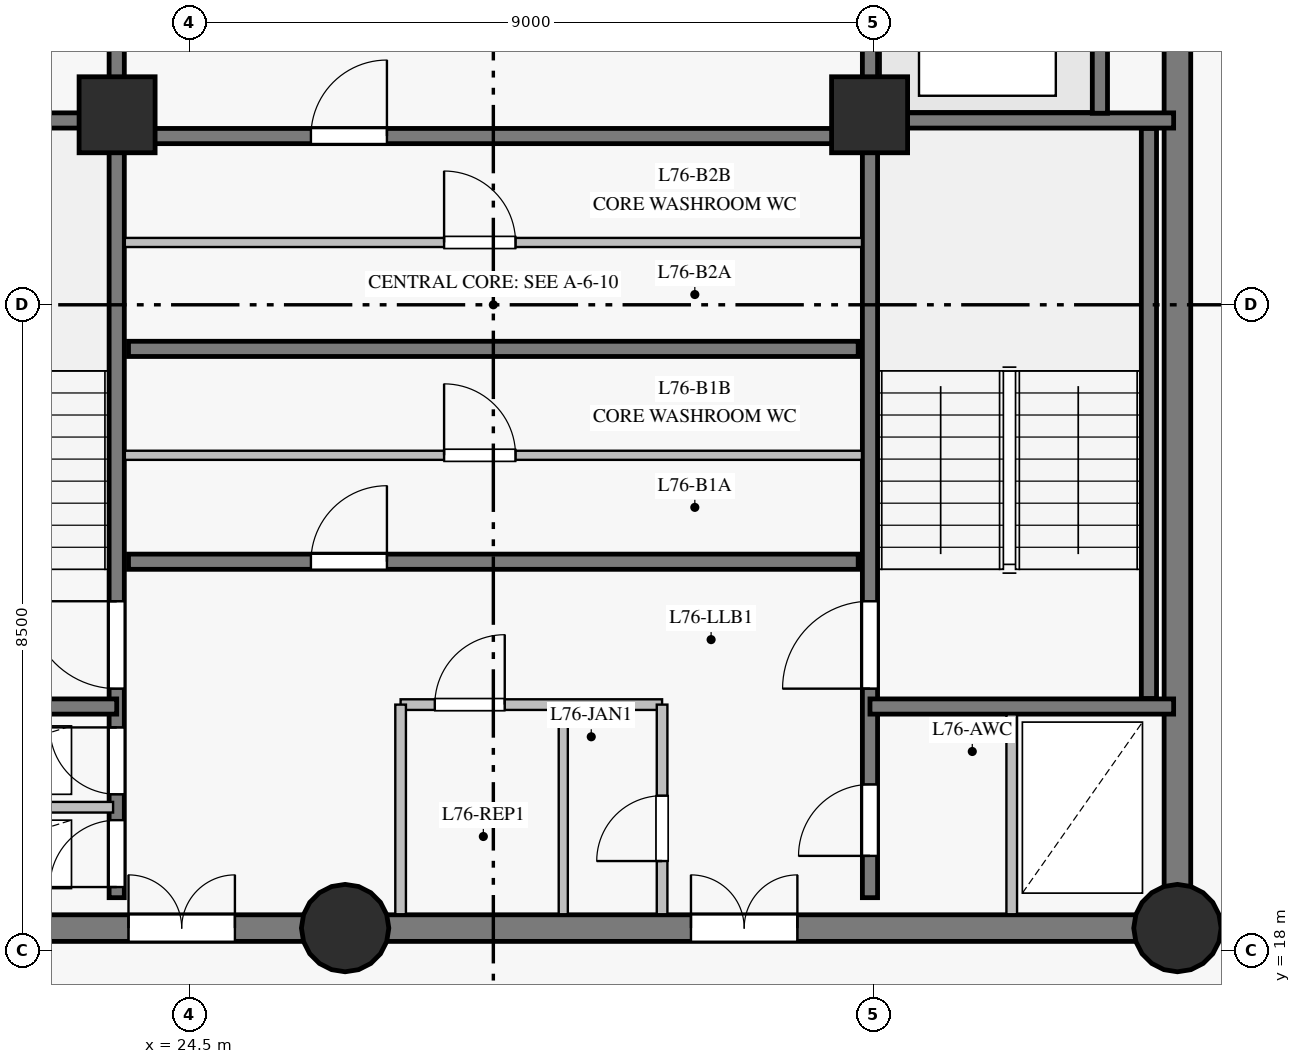
"""IFC4 building model, lengths in metres.
Left out: names, types, materials, properties, quantities, classifications, styles, units other than length and angle.
Written with IfcOpenShell. Run it as: python <this file> out.ifc"""

import sys

from ifc_helpers import new_model, si_unit, direction, frame, frame_2d, origin, origin_with_axes, origin_2d, place, context, subcontext, project, spatial, rectangle, circle, extrude, source, transform, mapped, element, fill, save


model = new_model("IFC4")
c1 = context("Model", 3, precision=1e-05, world=origin(), true_north=direction((0.0, 1.0)))
c2 = subcontext(c1, "Body", "Model", "MODEL_VIEW")
j1 = project(units=[si_unit("LENGTHUNIT", "METRE"), si_unit("PLANEANGLEUNIT", "RADIAN")], contexts=[c1])
p1 = place(None, origin())
s1 = spatial("IfcSite", under=j1, at=p1, CompositionType="ELEMENT")
p2 = place(p1, origin())
s2 = spatial("IfcBuilding", under=s1, at=p2, CompositionType="ELEMENT")
p3 = place(p2, frame((0.0, 0.0, 256.55)))
s3 = spatial("IfcBuildingStorey", under=s2, at=p3, CompositionType="ELEMENT", Elevation=256.55)
p4 = place(p3, frame((19.5, 18.3, 0.0), z_axis=(0.0, 0.0, 1.0), x_axis=(1.0, 0.0, 0.0)))
e1 = element("IfcWall", 1, at=p4, inside=s3, PredefinedType="SHEAR", context=c2, shape_type="SweptSolid", body=[
    extrude(rectangle(XDim=7.05, YDim=0.35, at=frame_2d((3.525, 0.0))), origin(), (0.0, 0.0, 1.0), 2.85),
])
p5 = place(p4, frame((4.2, 0.0, 0.0)))
e2 = element("IfcOpeningElement", 2, at=p5, cuts=e1, PredefinedType="OPENING", context=c2, shape_type="SweptSolid", body=[
    extrude(rectangle(XDim=1.4, YDim=2.2, at=frame_2d((0.7, 1.1))), frame((0.0, 0.185, 0.0), z_axis=(0.0, -1.0, 0.0), x_axis=(1.0, 0.0, 0.0)), (0.0, 0.0, 1.0), 0.37),
])
p6 = place(p3, frame((26.55, 18.3, 0.0), z_axis=(0.0, 0.0, 1.0), x_axis=(1.0, 0.0, 0.0)))
e3 = element("IfcWall", 3, at=p6, inside=s3, PredefinedType="SHEAR", context=c2, shape_type="SweptSolid", body=[
    extrude(rectangle(XDim=10.95, YDim=0.35, at=frame_2d((5.475, 0.0))), origin(), (0.0, 0.0, 1.0), 2.85),
])
p7 = place(p6, frame((4.55, 0.0, 0.0)))
e4 = element("IfcOpeningElement", 4, at=p7, cuts=e3, PredefinedType="OPENING", context=c2, shape_type="SweptSolid", body=[
    extrude(rectangle(XDim=1.4, YDim=2.2, at=frame_2d((0.7, 1.1))), frame((0.0, 0.185, 0.0), z_axis=(0.0, -1.0, 0.0), x_axis=(1.0, 0.0, 0.0)), (0.0, 0.0, 1.0), 0.37),
])
p8 = place(p3, frame((37.5, 18.3, 0.0), z_axis=(0.0, 0.0, 1.0), x_axis=(0.0, 1.0, 0.0)))
e5 = element("IfcWall", 5, at=p8, inside=s3, PredefinedType="SHEAR", context=c2, shape_type="SweptSolid", body=[
    extrude(rectangle(XDim=16.4, YDim=0.35, at=frame_2d((8.2, 0.0))), origin(), (0.0, 0.0, 1.0), 2.85),
])
p9 = place(p8, frame((13.85, 0.0, 0.0)))
e6 = element("IfcOpeningElement", 6, at=p9, cuts=e5, PredefinedType="OPENING", context=c2, shape_type="SweptSolid", body=[
    extrude(rectangle(XDim=1.2, YDim=2.15, at=frame_2d((0.6, 1.075))), frame((0.0, 0.185, 0.0), z_axis=(0.0, -1.0, 0.0), x_axis=(1.0, 0.0, 0.0)), (0.0, 0.0, 1.0), 0.37),
])
m1 = source(origin_with_axes(), c2, "Body", "SweptSolid", [
    extrude(circle(Radius=0.575, at=origin_2d()), origin(), (0.0, 0.0, 1.0), 3.05),
])
for number, where, z_axis, x_axis in (
    (7, (26.55, 18.3, 0.0), (0.0, 0.0, 1.0), (1.0, 0.0, 0.0)),
    (8, (37.5, 18.3, 0.0), (0.0, 0.0, 1.0), (1.0, 0.0, 0.0)),
):
    element("IfcColumn", number, at=place(p3, frame(where, z_axis=z_axis, x_axis=x_axis)), inside=s3, PredefinedType="COLUMN", context=c2, shape_type="MappedRepresentation", body=[
        mapped(m1, transform((0.0, 0.0, 0.0), scale=1.0)),
    ])
m2 = source(origin_with_axes(), c2, "Body", "SweptSolid", [
    extrude(rectangle(XDim=1.0, YDim=1.0, at=origin_2d()), origin(), (0.0, 0.0, 1.0), 3.05),
])
for number, where, z_axis, x_axis in (
    (9, (23.55, 29.0, 0.0), (0.0, 0.0, 1.0), (1.0, 0.0, 0.0)),
    (10, (33.45, 29.0, 0.0), (0.0, 0.0, 1.0), (1.0, 0.0, 0.0)),
):
    element("IfcColumn", number, at=place(p3, frame(where, z_axis=z_axis, x_axis=x_axis)), inside=s3, PredefinedType="COLUMN", context=c2, shape_type="MappedRepresentation", body=[
        mapped(m2, transform((0.0, 0.0, 0.0), scale=1.0)),
    ])
p10 = place(p3, frame((23.545, 18.7, 0.0), z_axis=(0.0, 0.0, 1.0), x_axis=(0.0, 1.0, 0.0)))
e11 = element("IfcWall", 11, at=p10, inside=s3, PredefinedType="SHEAR", context=c2, shape_type="SweptSolid", body=[
    extrude(rectangle(XDim=15.6, YDim=0.2, at=frame_2d((7.8, 0.0))), origin(), (0.0, 0.0, 1.0), 2.85),
])
p11 = place(p10, frame((2.75, 0.0, 0.0)))
e12 = element("IfcOpeningElement", 12, at=p11, cuts=e11, PredefinedType="OPENING", context=c2, shape_type="SweptSolid", body=[
    extrude(rectangle(XDim=1.15, YDim=2.15, at=frame_2d((0.575, 1.075))), frame((0.0, 0.11, 0.0), z_axis=(0.0, -1.0, 0.0), x_axis=(1.0, 0.0, 0.0)), (0.0, 0.0, 1.0), 0.22),
])
p12 = place(p10, frame((0.14, 0.0, 0.0)))
e13 = element("IfcOpeningElement", 13, at=p12, cuts=e11, PredefinedType="OPENING", context=c2, shape_type="SweptSolid", body=[
    extrude(rectangle(XDim=0.88, YDim=2.1, at=frame_2d((0.44, 1.05))), frame((0.0, 0.11, 0.0), z_axis=(0.0, -1.0, 0.0), x_axis=(1.0, 0.0, 0.0)), (0.0, 0.0, 1.0), 0.22),
])
p13 = place(p10, frame((1.36, 0.0, 0.0)))
e14 = element("IfcOpeningElement", 14, at=p13, cuts=e11, PredefinedType="OPENING", context=c2, shape_type="SweptSolid", body=[
    extrude(rectangle(XDim=0.88, YDim=2.1, at=frame_2d((0.44, 1.05))), frame((0.0, 0.11, 0.0), z_axis=(0.0, -1.0, 0.0), x_axis=(1.0, 0.0, 0.0)), (0.0, 0.0, 1.0), 0.22),
])
p14 = place(p10, frame((12.1, 0.0, 0.0)))
e15 = element("IfcOpeningElement", 15, at=p14, cuts=e11, PredefinedType="OPENING", context=c2, shape_type="SweptSolid", body=[
    extrude(rectangle(XDim=1.12, YDim=2.15, at=frame_2d((0.56, 1.075))), frame((0.0, 0.11, 0.0), z_axis=(0.0, -1.0, 0.0), x_axis=(1.0, 0.0, 0.0)), (0.0, 0.0, 1.0), 0.22),
])
p15 = place(p10, frame((14.05, 0.0, 0.0)))
e16 = element("IfcOpeningElement", 16, at=p15, cuts=e11, PredefinedType="OPENING", context=c2, shape_type="SweptSolid", body=[
    extrude(rectangle(XDim=1.12, YDim=2.15, at=frame_2d((0.56, 1.075))), frame((0.0, 0.11, 0.0), z_axis=(0.0, -1.0, 0.0), x_axis=(1.0, 0.0, 0.0)), (0.0, 0.0, 1.0), 0.22),
])
p16 = place(p3, frame((33.455, 18.7, 0.0), z_axis=(0.0, 0.0, 1.0), x_axis=(0.0, 1.0, 0.0)))
e17 = element("IfcWall", 17, at=p16, inside=s3, PredefinedType="SHEAR", context=c2, shape_type="SweptSolid", body=[
    extrude(rectangle(XDim=15.6, YDim=0.2, at=frame_2d((7.8, 0.0))), origin(), (0.0, 0.0, 1.0), 2.85),
])
p17 = place(p16, frame((2.75, 0.0, 0.0)))
e18 = element("IfcOpeningElement", 18, at=p17, cuts=e17, PredefinedType="OPENING", context=c2, shape_type="SweptSolid", body=[
    extrude(rectangle(XDim=1.15, YDim=2.15, at=frame_2d((0.575, 1.075))), frame((0.0, 0.11, 0.0), z_axis=(0.0, -1.0, 0.0), x_axis=(1.0, 0.0, 0.0)), (0.0, 0.0, 1.0), 0.22),
])
p18 = place(p16, frame((0.55, 0.0, 0.0)))
e19 = element("IfcOpeningElement", 19, at=p18, cuts=e17, PredefinedType="OPENING", context=c2, shape_type="SweptSolid", body=[
    extrude(rectangle(XDim=0.94, YDim=2.1, at=frame_2d((0.47, 1.05))), frame((0.0, 0.11, 0.0), z_axis=(0.0, -1.0, 0.0), x_axis=(1.0, 0.0, 0.0)), (0.0, 0.0, 1.0), 0.22),
])
p19 = place(p3, frame((23.7, 23.12, 0.0), z_axis=(0.0, 0.0, 1.0), x_axis=(1.0, 0.0, 0.0)))
e20 = element("IfcWall", 20, at=p19, inside=s3, PredefinedType="SHEAR", context=c2, shape_type="SweptSolid", body=[
    extrude(rectangle(XDim=9.6, YDim=0.2, at=frame_2d((4.8, 0.0))), origin(), (0.0, 0.0, 1.0), 2.85),
])
p20 = place(p19, frame((2.4, 0.0, 0.0)))
e21 = element("IfcOpeningElement", 21, at=p20, cuts=e20, PredefinedType="OPENING", context=c2, shape_type="SweptSolid", body=[
    extrude(rectangle(XDim=1.0, YDim=2.15, at=frame_2d((0.5, 1.075))), frame((0.0, 0.11, 0.0), z_axis=(0.0, -1.0, 0.0), x_axis=(1.0, 0.0, 0.0)), (0.0, 0.0, 1.0), 0.22),
])
p21 = place(p3, frame((23.7, 25.92, 0.0), z_axis=(0.0, 0.0, 1.0), x_axis=(1.0, 0.0, 0.0)))
e22 = element("IfcWall", 22, at=p21, inside=s3, PredefinedType="SHEAR", context=c2, shape_type="SweptSolid", body=[
    extrude(rectangle(XDim=9.6, YDim=0.2, at=frame_2d((4.8, 0.0))), origin(), (0.0, 0.0, 1.0), 2.85),
])
p22 = place(p3, frame((23.7, 28.72, 0.0), z_axis=(0.0, 0.0, 1.0), x_axis=(1.0, 0.0, 0.0)))
e23 = element("IfcWall", 23, at=p22, inside=s3, PredefinedType="SHEAR", context=c2, shape_type="SweptSolid", body=[
    extrude(rectangle(XDim=9.6, YDim=0.2, at=frame_2d((4.8, 0.0))), origin(), (0.0, 0.0, 1.0), 2.85),
])
p23 = place(p22, frame((2.4, 0.0, 0.0)))
e24 = element("IfcOpeningElement", 24, at=p23, cuts=e23, PredefinedType="OPENING", context=c2, shape_type="SweptSolid", body=[
    extrude(rectangle(XDim=1.0, YDim=2.15, at=frame_2d((0.5, 1.075))), frame((0.0, 0.11, 0.0), z_axis=(0.0, -1.0, 0.0), x_axis=(1.0, 0.0, 0.0)), (0.0, 0.0, 1.0), 0.22),
])
p24 = place(p3, frame((37.125, 21.32, 0.0), z_axis=(0.0, 0.0, 1.0), x_axis=(0.0, 1.0, 0.0)))
e25 = element("IfcWall", 25, at=p24, inside=s3, PredefinedType="SHEAR", context=c2, shape_type="SweptSolid", body=[
    extrude(rectangle(XDim=7.5, YDim=0.2, at=frame_2d((3.75, 0.0))), origin(), (0.0, 0.0, 1.0), 2.85),
])
for number, where, z_axis, x_axis in (
    (26, (33.455, 21.215, 0.0), (0.0, 0.0, 1.0), (1.0, 0.0, 0.0)),
    (27, (33.455, 28.925, 0.0), (0.0, 0.0, 1.0), (1.0, 0.0, 0.0)),
    (28, (19.55, 21.215, 0.0), (0.0, 0.0, 1.0), (1.0, 0.0, 0.0)),
    (29, (19.55, 28.925, 0.0), (0.0, 0.0, 1.0), (1.0, 0.0, 0.0)),
):
    element("IfcWall", number, at=place(p3, frame(where, z_axis=z_axis, x_axis=x_axis)), inside=s3, PredefinedType="SHEAR", context=c2, shape_type="SweptSolid", body=[
        extrude(rectangle(XDim=3.995, YDim=0.2, at=frame_2d((1.998, 0.0))), origin(), (0.0, 0.0, 1.0), 2.85),
    ])
p25 = place(p3, frame((36.48, 29.02, 0.0), z_axis=(0.0, 0.0, 1.0), x_axis=(0.0, 1.0, 0.0)))
e30 = element("IfcWall", 30, at=p25, inside=s3, PredefinedType="SHEAR", context=c2, shape_type="SweptSolid", body=[
    extrude(rectangle(XDim=2.86, YDim=0.2, at=frame_2d((1.43, 0.0))), origin(), (0.0, 0.0, 1.0), 2.85),
])
p26 = place(p3, frame((23.652, 24.52, 0.0), z_axis=(0.0, 0.0, 1.0), x_axis=(1.0, 0.0, 0.0)))
e31 = element("IfcWall", 31, at=p26, inside=s3, PredefinedType="PARTITIONING", context=c2, shape_type="SweptSolid", body=[
    extrude(rectangle(XDim=9.698, YDim=0.12, at=frame_2d((4.849, 0.0))), origin(), (0.0, 0.0, 1.0), 2.85),
])
p27 = place(p26, frame((4.2, 0.0, 0.0)))
e32 = element("IfcOpeningElement", 32, at=p27, cuts=e31, PredefinedType="OPENING", context=c2, shape_type="SweptSolid", body=[
    extrude(rectangle(XDim=0.94, YDim=2.1, at=frame_2d((0.47, 1.05))), frame((0.0, 0.07, 0.0), z_axis=(0.0, -1.0, 0.0), x_axis=(1.0, 0.0, 0.0)), (0.0, 0.0, 1.0), 0.14),
])
p28 = place(p3, frame((23.652, 27.32, 0.0), z_axis=(0.0, 0.0, 1.0), x_axis=(1.0, 0.0, 0.0)))
e33 = element("IfcWall", 33, at=p28, inside=s3, PredefinedType="PARTITIONING", context=c2, shape_type="SweptSolid", body=[
    extrude(rectangle(XDim=9.698, YDim=0.12, at=frame_2d((4.849, 0.0))), origin(), (0.0, 0.0, 1.0), 2.85),
])
p29 = place(p28, frame((4.2, 0.0, 0.0)))
e34 = element("IfcOpeningElement", 34, at=p29, cuts=e33, PredefinedType="OPENING", context=c2, shape_type="SweptSolid", body=[
    extrude(rectangle(XDim=0.94, YDim=2.1, at=frame_2d((0.47, 1.05))), frame((0.0, 0.07, 0.0), z_axis=(0.0, -1.0, 0.0), x_axis=(1.0, 0.0, 0.0)), (0.0, 0.0, 1.0), 0.14),
])
p30 = place(p3, frame((19.682, 19.89, 0.0), z_axis=(0.0, 0.0, 1.0), x_axis=(1.0, 0.0, 0.0)))
e35 = element("IfcWall", 35, at=p30, inside=s3, PredefinedType="PARTITIONING", context=c2, shape_type="SweptSolid", body=[
    extrude(rectangle(XDim=3.815, YDim=0.14, at=frame_2d((1.908, 0.0))), origin(), (0.0, 0.0, 1.0), 2.85),
])
p31 = place(p3, frame((27.28, 21.24, 0.0), z_axis=(0.0, 0.0, 1.0), x_axis=(1.0, 0.0, 0.0)))
e36 = element("IfcWall", 36, at=p31, inside=s3, PredefinedType="PARTITIONING", context=c2, shape_type="SweptSolid", body=[
    extrude(rectangle(XDim=3.44, YDim=0.14, at=frame_2d((1.72, 0.0))), origin(), (0.0, 0.0, 1.0), 2.85),
])
p32 = place(p31, frame((0.45, 0.0, 0.0)))
e37 = element("IfcOpeningElement", 37, at=p32, cuts=e36, PredefinedType="OPENING", context=c2, shape_type="SweptSolid", body=[
    extrude(rectangle(XDim=0.92, YDim=2.1, at=frame_2d((0.46, 1.05))), frame((0.0, 0.08, 0.0), z_axis=(0.0, -1.0, 0.0), x_axis=(1.0, 0.0, 0.0)), (0.0, 0.0, 1.0), 0.16),
])
p33 = place(p3, frame((27.28, 18.482, 0.0), z_axis=(0.0, 0.0, 1.0), x_axis=(0.0, 1.0, 0.0)))
e38 = element("IfcWall", 38, at=p33, inside=s3, PredefinedType="PARTITIONING", context=c2, shape_type="SweptSolid", body=[
    extrude(rectangle(XDim=2.758, YDim=0.14, at=frame_2d((1.379, 0.0))), origin(), (0.0, 0.0, 1.0), 2.85),
])
p34 = place(p3, frame((30.72, 18.482, 0.0), z_axis=(0.0, 0.0, 1.0), x_axis=(0.0, 1.0, 0.0)))
e39 = element("IfcWall", 39, at=p34, inside=s3, PredefinedType="PARTITIONING", context=c2, shape_type="SweptSolid", body=[
    extrude(rectangle(XDim=2.758, YDim=0.14, at=frame_2d((1.379, 0.0))), origin(), (0.0, 0.0, 1.0), 2.85),
])
p35 = place(p34, frame((0.7, 0.0, 0.0)))
e40 = element("IfcOpeningElement", 40, at=p35, cuts=e39, PredefinedType="OPENING", context=c2, shape_type="SweptSolid", body=[
    extrude(rectangle(XDim=0.86, YDim=2.1, at=frame_2d((0.43, 1.05))), frame((0.0, 0.08, 0.0), z_axis=(0.0, -1.0, 0.0), x_axis=(1.0, 0.0, 0.0)), (0.0, 0.0, 1.0), 0.16),
])
p36 = place(p3, frame((29.42, 18.482, 0.0), z_axis=(0.0, 0.0, 1.0), x_axis=(0.0, 1.0, 0.0)))
e41 = element("IfcWall", 41, at=p36, inside=s3, PredefinedType="PARTITIONING", context=c2, shape_type="SweptSolid", body=[
    extrude(rectangle(XDim=2.687, YDim=0.12, at=frame_2d((1.344, 0.0))), origin(), (0.0, 0.0, 1.0), 2.85),
])
p37 = place(p3, frame((35.32, 18.482, 0.0), z_axis=(0.0, 0.0, 1.0), x_axis=(0.0, 1.0, 0.0)))
e42 = element("IfcWall", 42, at=p37, inside=s3, PredefinedType="PARTITIONING", context=c2, shape_type="SweptSolid", body=[
    extrude(rectangle(XDim=2.629, YDim=0.14, at=frame_2d((1.314, 0.0))), origin(), (0.0, 0.0, 1.0), 2.85),
])
m3 = source(origin_with_axes(), c2, "Body", "SweptSolid", [
    extrude(rectangle(XDim=1.15, YDim=2.15, at=frame_2d((0.575, 1.075))), frame((0.0, 0.025, 0.0), z_axis=(0.0, -1.0, 0.0), x_axis=(1.0, 0.0, 0.0)), (0.0, 0.0, 1.0), 0.05),
])
p38 = place(p11, origin())
e43 = element("IfcDoor", 43, at=p38, inside=s3, OperationType="SINGLE_SWING_RIGHT", PredefinedType="DOOR", context=c2, shape_type="MappedRepresentation", body=[
    mapped(m3, transform((0.0, 0.0, 0.0), scale=1.0)),
])
fill(e12, e43)
p39 = place(p17, origin())
e44 = element("IfcDoor", 44, at=p39, inside=s3, OperationType="SINGLE_SWING_LEFT", PredefinedType="DOOR", context=c2, shape_type="MappedRepresentation", body=[
    mapped(m3, transform((0.0, 0.0, 0.0), scale=1.0)),
])
fill(e18, e44)
m4 = source(origin_with_axes(), c2, "Body", "SweptSolid", [
    extrude(rectangle(XDim=0.88, YDim=2.1, at=frame_2d((0.44, 1.05))), frame((0.0, 0.025, 0.0), z_axis=(0.0, -1.0, 0.0), x_axis=(1.0, 0.0, 0.0)), (0.0, 0.0, 1.0), 0.05),
])
p40 = place(p12, origin())
e45 = element("IfcDoor", 45, at=p40, inside=s3, OperationType="SINGLE_SWING_LEFT", PredefinedType="DOOR", context=c2, shape_type="MappedRepresentation", body=[
    mapped(m4, transform((0.0, 0.0, 0.0), scale=1.0)),
])
fill(e13, e45)
p41 = place(p13, origin())
e46 = element("IfcDoor", 46, at=p41, inside=s3, OperationType="SINGLE_SWING_RIGHT", PredefinedType="DOOR", context=c2, shape_type="MappedRepresentation", body=[
    mapped(m4, transform((0.0, 0.0, 0.0), scale=1.0)),
])
fill(e14, e46)
m5 = source(origin_with_axes(), c2, "Body", "SweptSolid", [
    extrude(rectangle(XDim=1.4, YDim=2.2, at=frame_2d((0.7, 1.1))), frame((0.0, 0.025, 0.0), z_axis=(0.0, -1.0, 0.0), x_axis=(1.0, 0.0, 0.0)), (0.0, 0.0, 1.0), 0.05),
])
p42 = place(p5, origin())
e47 = element("IfcDoor", 47, at=p42, inside=s3, OperationType="DOUBLE_DOOR_SINGLE_SWING", PredefinedType="DOOR", context=c2, shape_type="MappedRepresentation", body=[
    mapped(m5, transform((0.0, 0.0, 0.0), scale=1.0)),
])
fill(e2, e47)
p43 = place(p7, origin())
e48 = element("IfcDoor", 48, at=p43, inside=s3, OperationType="DOUBLE_DOOR_SINGLE_SWING", PredefinedType="DOOR", context=c2, shape_type="MappedRepresentation", body=[
    mapped(m5, transform((0.0, 0.0, 0.0), scale=1.0)),
])
fill(e4, e48)
m6 = source(origin_with_axes(), c2, "Body", "SweptSolid", [
    extrude(rectangle(XDim=0.94, YDim=2.1, at=frame_2d((0.47, 1.05))), frame((0.0, 0.025, 0.0), z_axis=(0.0, -1.0, 0.0), x_axis=(1.0, 0.0, 0.0)), (0.0, 0.0, 1.0), 0.05),
])
p44 = place(p18, origin())
e49 = element("IfcDoor", 49, at=p44, inside=s3, OperationType="SINGLE_SWING_LEFT", PredefinedType="DOOR", context=c2, shape_type="MappedRepresentation", body=[
    mapped(m6, transform((0.0, 0.0, 0.0), scale=1.0)),
])
fill(e19, e49)
m7 = source(origin_with_axes(), c2, "Body", "SweptSolid", [
    extrude(rectangle(XDim=0.92, YDim=2.1, at=frame_2d((0.46, 1.05))), frame((0.0, 0.025, 0.0), z_axis=(0.0, -1.0, 0.0), x_axis=(1.0, 0.0, 0.0)), (0.0, 0.0, 1.0), 0.05),
])
p45 = place(p32, origin())
e50 = element("IfcDoor", 50, at=p45, inside=s3, OperationType="SINGLE_SWING_RIGHT", PredefinedType="DOOR", context=c2, shape_type="MappedRepresentation", body=[
    mapped(m7, transform((0.0, 0.0, 0.0), scale=1.0)),
])
fill(e37, e50)
m8 = source(origin_with_axes(), c2, "Body", "SweptSolid", [
    extrude(rectangle(XDim=0.86, YDim=2.1, at=frame_2d((0.43, 1.05))), frame((0.0, 0.025, 0.0), z_axis=(0.0, -1.0, 0.0), x_axis=(1.0, 0.0, 0.0)), (0.0, 0.0, 1.0), 0.05),
])
p46 = place(p35, origin())
e51 = element("IfcDoor", 51, at=p46, inside=s3, OperationType="SINGLE_SWING_LEFT", PredefinedType="DOOR", context=c2, shape_type="MappedRepresentation", body=[
    mapped(m8, transform((0.0, 0.0, 0.0), scale=1.0)),
])
fill(e40, e51)
m9 = source(origin_with_axes(), c2, "Body", "SweptSolid", [
    extrude(rectangle(XDim=1.0, YDim=2.15, at=frame_2d((0.5, 1.075))), frame((0.0, 0.025, 0.0), z_axis=(0.0, -1.0, 0.0), x_axis=(1.0, 0.0, 0.0)), (0.0, 0.0, 1.0), 0.05),
])
p47 = place(p20, origin())
e52 = element("IfcDoor", 52, at=p47, inside=s3, OperationType="SINGLE_SWING_RIGHT", PredefinedType="DOOR", context=c2, shape_type="MappedRepresentation", body=[
    mapped(m9, transform((0.0, 0.0, 0.0), scale=1.0)),
])
fill(e21, e52)
p48 = place(p27, origin())
e53 = element("IfcDoor", 53, at=p48, inside=s3, OperationType="SINGLE_SWING_LEFT", PredefinedType="DOOR", context=c2, shape_type="MappedRepresentation", body=[
    mapped(m6, transform((0.0, 0.0, 0.0), scale=1.0)),
])
fill(e32, e53)
p49 = place(p23, origin())
e54 = element("IfcDoor", 54, at=p49, inside=s3, OperationType="SINGLE_SWING_RIGHT", PredefinedType="DOOR", context=c2, shape_type="MappedRepresentation", body=[
    mapped(m9, transform((0.0, 0.0, 0.0), scale=1.0)),
])
fill(e24, e54)
p50 = place(p29, origin())
e55 = element("IfcDoor", 55, at=p50, inside=s3, OperationType="SINGLE_SWING_LEFT", PredefinedType="DOOR", context=c2, shape_type="MappedRepresentation", body=[
    mapped(m6, transform((0.0, 0.0, 0.0), scale=1.0)),
])
fill(e34, e55)
save(model, sys.argv[1])
